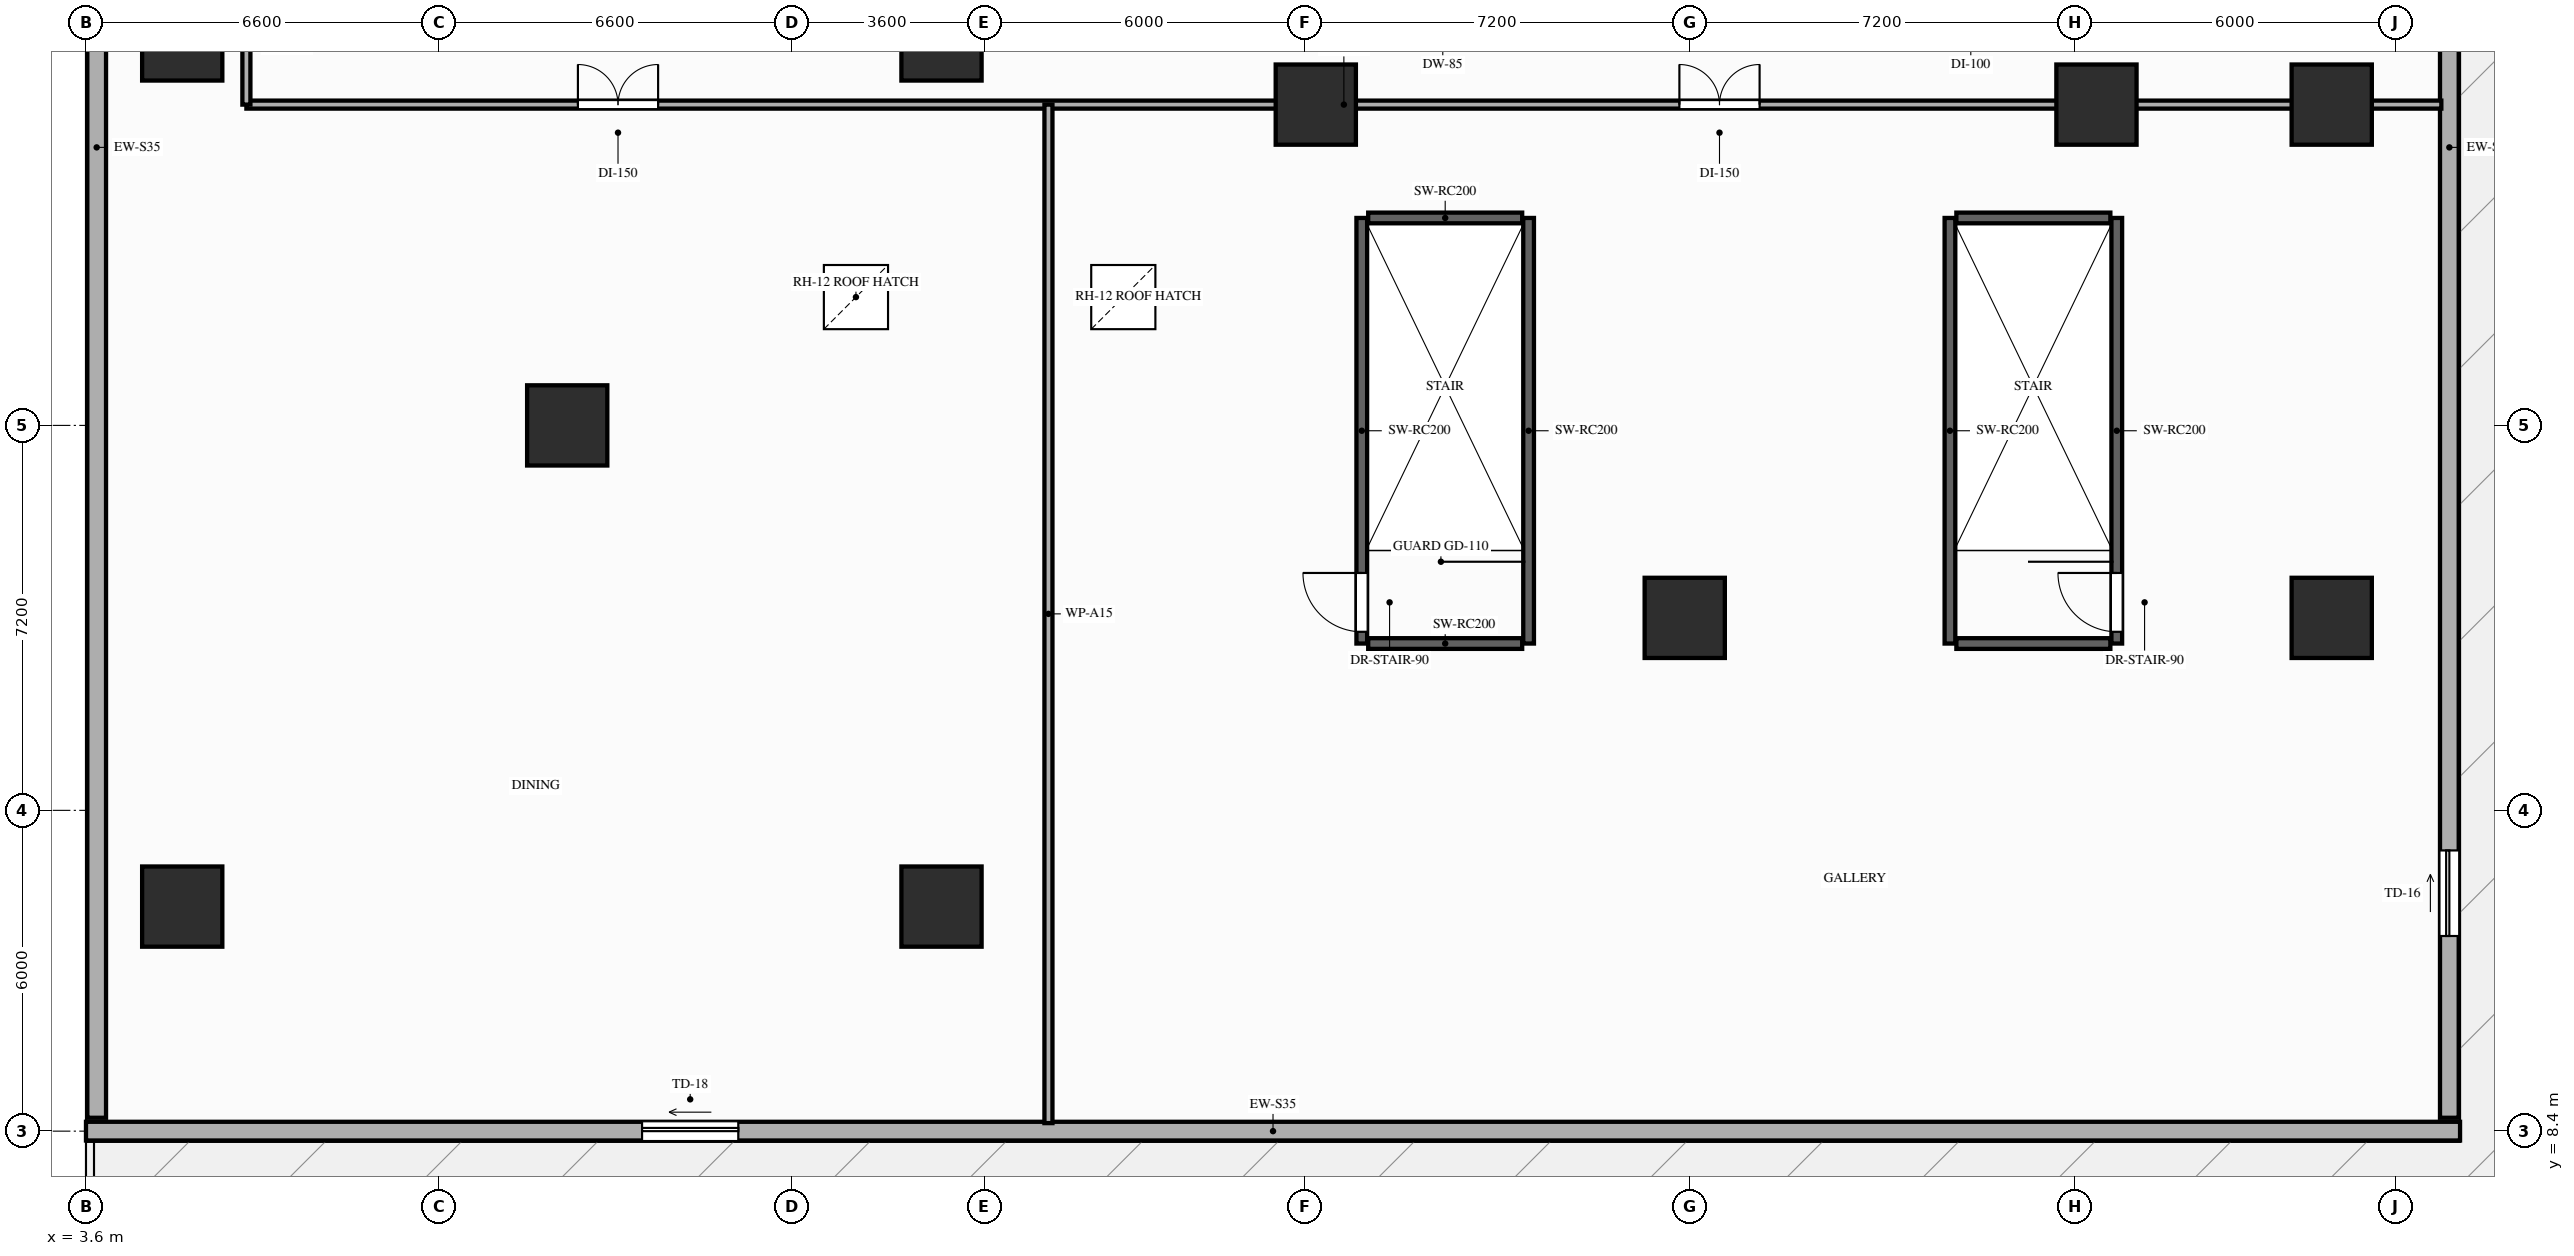
"""IFC4 building model, lengths in metres.
Left out: names, types, materials, properties, quantities, classifications, styles, units other than length and angle.
Written with IfcOpenShell. Run it as: python <this file> out.ifc"""

import sys

from ifc_helpers import new_model, si_unit, direction, frame, frame_2d, origin, origin_2d, place, context, subcontext, project, spatial, rectangle, extrude, element, fill, save


model = new_model("IFC4")
c1 = context("Model", 3, precision=1e-05, world=origin(), true_north=direction((0.0, 1.0)))
c2 = subcontext(c1, "Body", "Model", "MODEL_VIEW")
j1 = project(units=[si_unit("LENGTHUNIT", "METRE"), si_unit("PLANEANGLEUNIT", "RADIAN")], contexts=[c1])
p1 = place(None, origin())
s1 = spatial("IfcSite", under=j1, at=p1, CompositionType="ELEMENT")
p2 = place(p1, origin())
s2 = spatial("IfcBuilding", under=s1, at=p2, CompositionType="ELEMENT")
p3 = place(p2, frame((0.0, 0.0, 21.8)))
s3 = spatial("IfcBuildingStorey", under=s2, at=p3, CompositionType="ELEMENT", Elevation=21.8)
for number, where, z_axis, x_axis in (
    (1, (5.4, 12.6, 0.0), (0.0, 0.0, 1.0), (1.0, 0.0, 0.0)),
    (2, (19.6, 12.6, 0.0), (0.0, 0.0, 1.0), (1.0, 0.0, 0.0)),
    (3, (5.4, 28.8, 0.0), (0.0, 0.0, 1.0), (1.0, 0.0, 0.0)),
    (4, (19.6, 28.8, 0.0), (0.0, 0.0, 1.0), (1.0, 0.0, 0.0)),
    (5, (26.6, 27.6, 0.0), (0.0, 0.0, 1.0), (1.0, 0.0, 0.0)),
    (6, (41.2, 27.6, 0.0), (0.0, 0.0, 1.0), (1.0, 0.0, 0.0)),
):
    element("IfcColumn", number, at=place(p3, frame(where, z_axis=z_axis, x_axis=x_axis)), inside=s3, PredefinedType="COLUMN", context=c2, shape_type="SweptSolid", body=[
        extrude(rectangle(XDim=1.5, YDim=1.5, at=origin_2d()), origin(), (0.0, 0.0, 1.0), 4.05),
    ])
for number, where, z_axis, x_axis in (
    (7, (45.6, 27.6, 0.0), (0.0, 0.0, 1.0), (1.0, 0.0, 0.0)),
    (8, (12.6, 21.6, 0.0), (0.0, 0.0, 1.0), (1.0, 0.0, 0.0)),
    (9, (33.5, 18.0, 0.0), (0.0, 0.0, 1.0), (1.0, 0.0, 0.0)),
    (10, (45.6, 18.0, 0.0), (0.0, 0.0, 1.0), (1.0, 0.0, 0.0)),
):
    element("IfcColumn", number, at=place(p3, frame(where, z_axis=z_axis, x_axis=x_axis)), inside=s3, PredefinedType="COLUMN", context=c2, shape_type="SweptSolid", body=[
        extrude(rectangle(XDim=1.5, YDim=1.5, at=origin_2d()), origin(), (0.0, 0.0, 1.0), 4.6),
    ])
p4 = place(p3, frame((3.6, 8.4, 0.0), z_axis=(0.0, 0.0, 1.0), x_axis=(1.0, 0.0, 0.0)))
e11 = element("IfcWall", 11, at=p4, inside=s3, PredefinedType="STANDARD", context=c2, shape_type="SweptSolid", body=[
    extrude(rectangle(XDim=44.4, YDim=0.35, at=frame_2d((22.2, 0.0))), origin(), (0.0, 0.0, 1.0), 4.36),
])
p5 = place(p4, frame((10.4, 0.0, 0.0)))
e12 = element("IfcOpeningElement", 12, at=p5, cuts=e11, PredefinedType="OPENING", context=c2, shape_type="SweptSolid", body=[
    extrude(rectangle(XDim=1.8, YDim=2.2, at=frame_2d((0.9, 1.1))), frame((0.0, 0.185, 0.0), z_axis=(0.0, -1.0, 0.0), x_axis=(1.0, 0.0, 0.0)), (0.0, 0.0, 1.0), 0.37),
])
p6 = place(p3, frame((3.8, 44.95, 0.0), z_axis=(0.0, 0.0, 1.0), x_axis=(0.0, -1.0, 0.0)))
e13 = element("IfcWall", 13, at=p6, inside=s3, PredefinedType="STANDARD", context=c2, shape_type="SweptSolid", body=[
    extrude(rectangle(XDim=36.3, YDim=0.35, at=frame_2d((18.15, 0.0))), origin(), (0.0, 0.0, 1.0), 4.06),
])
p7 = place(p3, frame((47.8, 8.65, 0.0), z_axis=(0.0, 0.0, 1.0), x_axis=(0.0, 1.0, 0.0)))
e14 = element("IfcWall", 14, at=p7, inside=s3, PredefinedType="STANDARD", context=c2, shape_type="SweptSolid", body=[
    extrude(rectangle(XDim=36.3, YDim=0.35, at=frame_2d((18.15, 0.0))), origin(), (0.0, 0.0, 1.0), 4.36),
])
p8 = place(p7, frame((3.4, 0.0, 0.0)))
e15 = element("IfcOpeningElement", 15, at=p8, cuts=e14, PredefinedType="OPENING", context=c2, shape_type="SweptSolid", body=[
    extrude(rectangle(XDim=1.6, YDim=2.15, at=frame_2d((0.8, 1.075))), frame((0.0, 0.185, 0.0), z_axis=(0.0, -1.0, 0.0), x_axis=(1.0, 0.0, 0.0)), (0.0, 0.0, 1.0), 0.37),
])
p9 = place(p3, frame((27.46, 17.52, 0.0), z_axis=(0.0, 0.0, 1.0), x_axis=(0.0, 1.0, 0.0)))
e16 = element("IfcWall", 16, at=p9, inside=s3, PredefinedType="SHEAR", context=c2, shape_type="SweptSolid", body=[
    extrude(rectangle(XDim=7.96, YDim=0.2, at=frame_2d((3.98, 0.0))), origin(), (0.0, 0.0, 1.0), 4.36),
])
p10 = place(p9, frame((0.22, 0.0, 0.0)))
e17 = element("IfcOpeningElement", 17, at=p10, cuts=e16, PredefinedType="OPENING", context=c2, shape_type="SweptSolid", body=[
    extrude(rectangle(XDim=1.1, YDim=2.15, at=frame_2d((0.55, 1.075))), frame((0.0, 0.11, 0.0), z_axis=(0.0, -1.0, 0.0), x_axis=(1.0, 0.0, 0.0)), (0.0, 0.0, 1.0), 0.22),
])
p11 = place(p3, frame((30.58, 17.52, 0.0), z_axis=(0.0, 0.0, 1.0), x_axis=(0.0, 1.0, 0.0)))
e18 = element("IfcWall", 18, at=p11, inside=s3, PredefinedType="SHEAR", context=c2, shape_type="SweptSolid", body=[
    extrude(rectangle(XDim=7.96, YDim=0.2, at=frame_2d((3.98, 0.0))), origin(), (0.0, 0.0, 1.0), 4.36),
])
for number, where, z_axis, x_axis in (
    (19, (27.58, 25.48, 0.0), (0.0, 0.0, 1.0), (1.0, 0.0, 0.0)),
    (20, (27.58, 17.52, 0.0), (0.0, 0.0, 1.0), (1.0, 0.0, 0.0)),
):
    element("IfcWall", number, at=place(p3, frame(where, z_axis=z_axis, x_axis=x_axis)), inside=s3, PredefinedType="SHEAR", context=c2, shape_type="SweptSolid", body=[
        extrude(rectangle(XDim=2.88, YDim=0.2, at=frame_2d((1.44, 0.0))), origin(), (0.0, 0.0, 1.0), 4.36),
    ])
p12 = place(p3, frame((38.46, 17.52, 0.0), z_axis=(0.0, 0.0, 1.0), x_axis=(0.0, 1.0, 0.0)))
e21 = element("IfcWall", 21, at=p12, inside=s3, PredefinedType="SHEAR", context=c2, shape_type="SweptSolid", body=[
    extrude(rectangle(XDim=7.96, YDim=0.2, at=frame_2d((3.98, 0.0))), origin(), (0.0, 0.0, 1.0), 4.36),
])
p13 = place(p3, frame((41.58, 17.52, 0.0), z_axis=(0.0, 0.0, 1.0), x_axis=(0.0, 1.0, 0.0)))
e22 = element("IfcWall", 22, at=p13, inside=s3, PredefinedType="SHEAR", context=c2, shape_type="SweptSolid", body=[
    extrude(rectangle(XDim=7.96, YDim=0.2, at=frame_2d((3.98, 0.0))), origin(), (0.0, 0.0, 1.0), 4.36),
])
p14 = place(p13, frame((0.22, 0.0, 0.0)))
e23 = element("IfcOpeningElement", 23, at=p14, cuts=e22, PredefinedType="OPENING", context=c2, shape_type="SweptSolid", body=[
    extrude(rectangle(XDim=1.1, YDim=2.15, at=frame_2d((0.55, 1.075))), frame((0.0, 0.11, 0.0), z_axis=(0.0, -1.0, 0.0), x_axis=(1.0, 0.0, 0.0)), (0.0, 0.0, 1.0), 0.22),
])
for number, where, z_axis, x_axis in (
    (24, (38.58, 25.48, 0.0), (0.0, 0.0, 1.0), (1.0, 0.0, 0.0)),
    (25, (38.58, 17.52, 0.0), (0.0, 0.0, 1.0), (1.0, 0.0, 0.0)),
):
    element("IfcWall", number, at=place(p3, frame(where, z_axis=z_axis, x_axis=x_axis)), inside=s3, PredefinedType="SHEAR", context=c2, shape_type="SweptSolid", body=[
        extrude(rectangle(XDim=2.88, YDim=0.2, at=frame_2d((1.44, 0.0))), origin(), (0.0, 0.0, 1.0), 4.36),
    ])
p15 = place(p3, frame((6.6, 27.6, 0.0), z_axis=(0.0, 0.0, 1.0), x_axis=(1.0, 0.0, 0.0)))
e26 = element("IfcWall", 26, at=p15, inside=s3, PredefinedType="PARTITIONING", context=c2, shape_type="SweptSolid", body=[
    extrude(rectangle(XDim=41.05, YDim=0.15, at=frame_2d((20.525, 0.0))), origin(), (0.0, 0.0, 1.0), 2.34),
])
p16 = place(p15, frame((6.2, 0.0, 0.0)))
e27 = element("IfcOpeningElement", 27, at=p16, cuts=e26, PredefinedType="OPENING", context=c2, shape_type="SweptSolid", body=[
    extrude(rectangle(XDim=1.5, YDim=2.18, at=frame_2d((0.75, 1.09))), frame((0.0, 0.085, 0.0), z_axis=(0.0, -1.0, 0.0), x_axis=(1.0, 0.0, 0.0)), (0.0, 0.0, 1.0), 0.17),
])
p17 = place(p15, frame((26.8, 0.0, 0.0)))
e28 = element("IfcOpeningElement", 28, at=p17, cuts=e26, PredefinedType="OPENING", context=c2, shape_type="SweptSolid", body=[
    extrude(rectangle(XDim=1.5, YDim=2.18, at=frame_2d((0.75, 1.09))), frame((0.0, 0.085, 0.0), z_axis=(0.0, -1.0, 0.0), x_axis=(1.0, 0.0, 0.0)), (0.0, 0.0, 1.0), 0.17),
])
p18 = place(p3, frame((6.6, 27.6, 0.0), z_axis=(0.0, 0.0, 1.0), x_axis=(0.0, 1.0, 0.0)))
e29 = element("IfcWall", 29, at=p18, inside=s3, PredefinedType="PARTITIONING", context=c2, shape_type="SweptSolid", body=[
    extrude(rectangle(XDim=2.2, YDim=0.15, at=frame_2d((1.1, 0.0))), origin(), (0.0, 0.0, 1.0), 3.74),
])
p19 = place(p3, frame((21.6, 8.55, 0.0), z_axis=(0.0, 0.0, 1.0), x_axis=(0.0, 1.0, 0.0)))
e30 = element("IfcWall", 30, at=p19, inside=s3, PredefinedType="PARTITIONING", context=c2, shape_type="SweptSolid", body=[
    extrude(rectangle(XDim=19.05, YDim=0.15, at=frame_2d((9.525, 0.0))), origin(), (0.0, 0.0, 1.0), 3.62),
])
p20 = place(p5, origin())
e31 = element("IfcDoor", 31, at=p20, inside=s3, OperationType="SLIDING_TO_LEFT", PredefinedType="DOOR", context=c2, shape_type="SweptSolid", body=[
    extrude(rectangle(XDim=1.8, YDim=2.2, at=frame_2d((0.9, 1.1))), frame((0.0, 0.025, 0.0), z_axis=(0.0, -1.0, 0.0), x_axis=(1.0, 0.0, 0.0)), (0.0, 0.0, 1.0), 0.05),
])
fill(e12, e31)
p21 = place(p8, origin())
e32 = element("IfcDoor", 32, at=p21, inside=s3, OperationType="SLIDING_TO_RIGHT", PredefinedType="DOOR", context=c2, shape_type="SweptSolid", body=[
    extrude(rectangle(XDim=1.6, YDim=2.15, at=frame_2d((0.8, 1.075))), frame((0.0, 0.025, 0.0), z_axis=(0.0, -1.0, 0.0), x_axis=(1.0, 0.0, 0.0)), (0.0, 0.0, 1.0), 0.05),
])
fill(e15, e32)
p22 = place(p3, frame((0.0, 0.0, -0.3)))
p23 = place(p22, frame((18.0, 24.0, 0.0)))
p24 = place(p23, frame((0.0, 0.0, 0.25)))
e33 = element("IfcWindow", 33, at=p24, inside=s3, PartitioningType="SINGLE_PANEL", PredefinedType="SKYLIGHT", context=c2, shape_type="SweptSolid", body=[
    extrude(rectangle(XDim=1.2, YDim=1.2, at=origin_2d()), origin(), (0.0, 0.0, 1.0), 0.05),
])
p25 = place(p22, frame((23.0, 24.0, 0.0)))
p26 = place(p25, frame((0.0, 0.0, 0.25)))
e34 = element("IfcWindow", 34, at=p26, inside=s3, PartitioningType="SINGLE_PANEL", PredefinedType="SKYLIGHT", context=c2, shape_type="SweptSolid", body=[
    extrude(rectangle(XDim=1.2, YDim=1.2, at=origin_2d()), origin(), (0.0, 0.0, 1.0), 0.05),
])
p27 = place(p10, origin())
e35 = element("IfcDoor", 35, at=p27, inside=s3, OperationType="SINGLE_SWING_RIGHT", PredefinedType="DOOR", context=c2, shape_type="SweptSolid", body=[
    extrude(rectangle(XDim=1.1, YDim=2.15, at=frame_2d((0.55, 1.075))), frame((0.0, 0.025, 0.0), z_axis=(0.0, -1.0, 0.0), x_axis=(1.0, 0.0, 0.0)), (0.0, 0.0, 1.0), 0.05),
])
fill(e17, e35)
p28 = place(p14, origin())
e36 = element("IfcDoor", 36, at=p28, inside=s3, OperationType="SINGLE_SWING_RIGHT", PredefinedType="DOOR", context=c2, shape_type="SweptSolid", body=[
    extrude(rectangle(XDim=1.1, YDim=2.15, at=frame_2d((0.55, 1.075))), frame((0.0, 0.025, 0.0), z_axis=(0.0, -1.0, 0.0), x_axis=(1.0, 0.0, 0.0)), (0.0, 0.0, 1.0), 0.05),
])
fill(e23, e36)
p29 = place(p16, origin())
e37 = element("IfcDoor", 37, at=p29, inside=s3, OperationType="DOUBLE_DOOR_SINGLE_SWING", PredefinedType="DOOR", context=c2, shape_type="SweptSolid", body=[
    extrude(rectangle(XDim=1.5, YDim=2.18, at=frame_2d((0.75, 1.09))), frame((0.0, 0.025, 0.0), z_axis=(0.0, -1.0, 0.0), x_axis=(1.0, 0.0, 0.0)), (0.0, 0.0, 1.0), 0.05),
])
fill(e27, e37)
p30 = place(p17, origin())
e38 = element("IfcDoor", 38, at=p30, inside=s3, OperationType="DOUBLE_DOOR_SINGLE_SWING", PredefinedType="DOOR", context=c2, shape_type="SweptSolid", body=[
    extrude(rectangle(XDim=1.5, YDim=2.18, at=frame_2d((0.75, 1.09))), frame((0.0, 0.025, 0.0), z_axis=(0.0, -1.0, 0.0), x_axis=(1.0, 0.0, 0.0)), (0.0, 0.0, 1.0), 0.05),
])
fill(e28, e38)
save(model, sys.argv[1])
